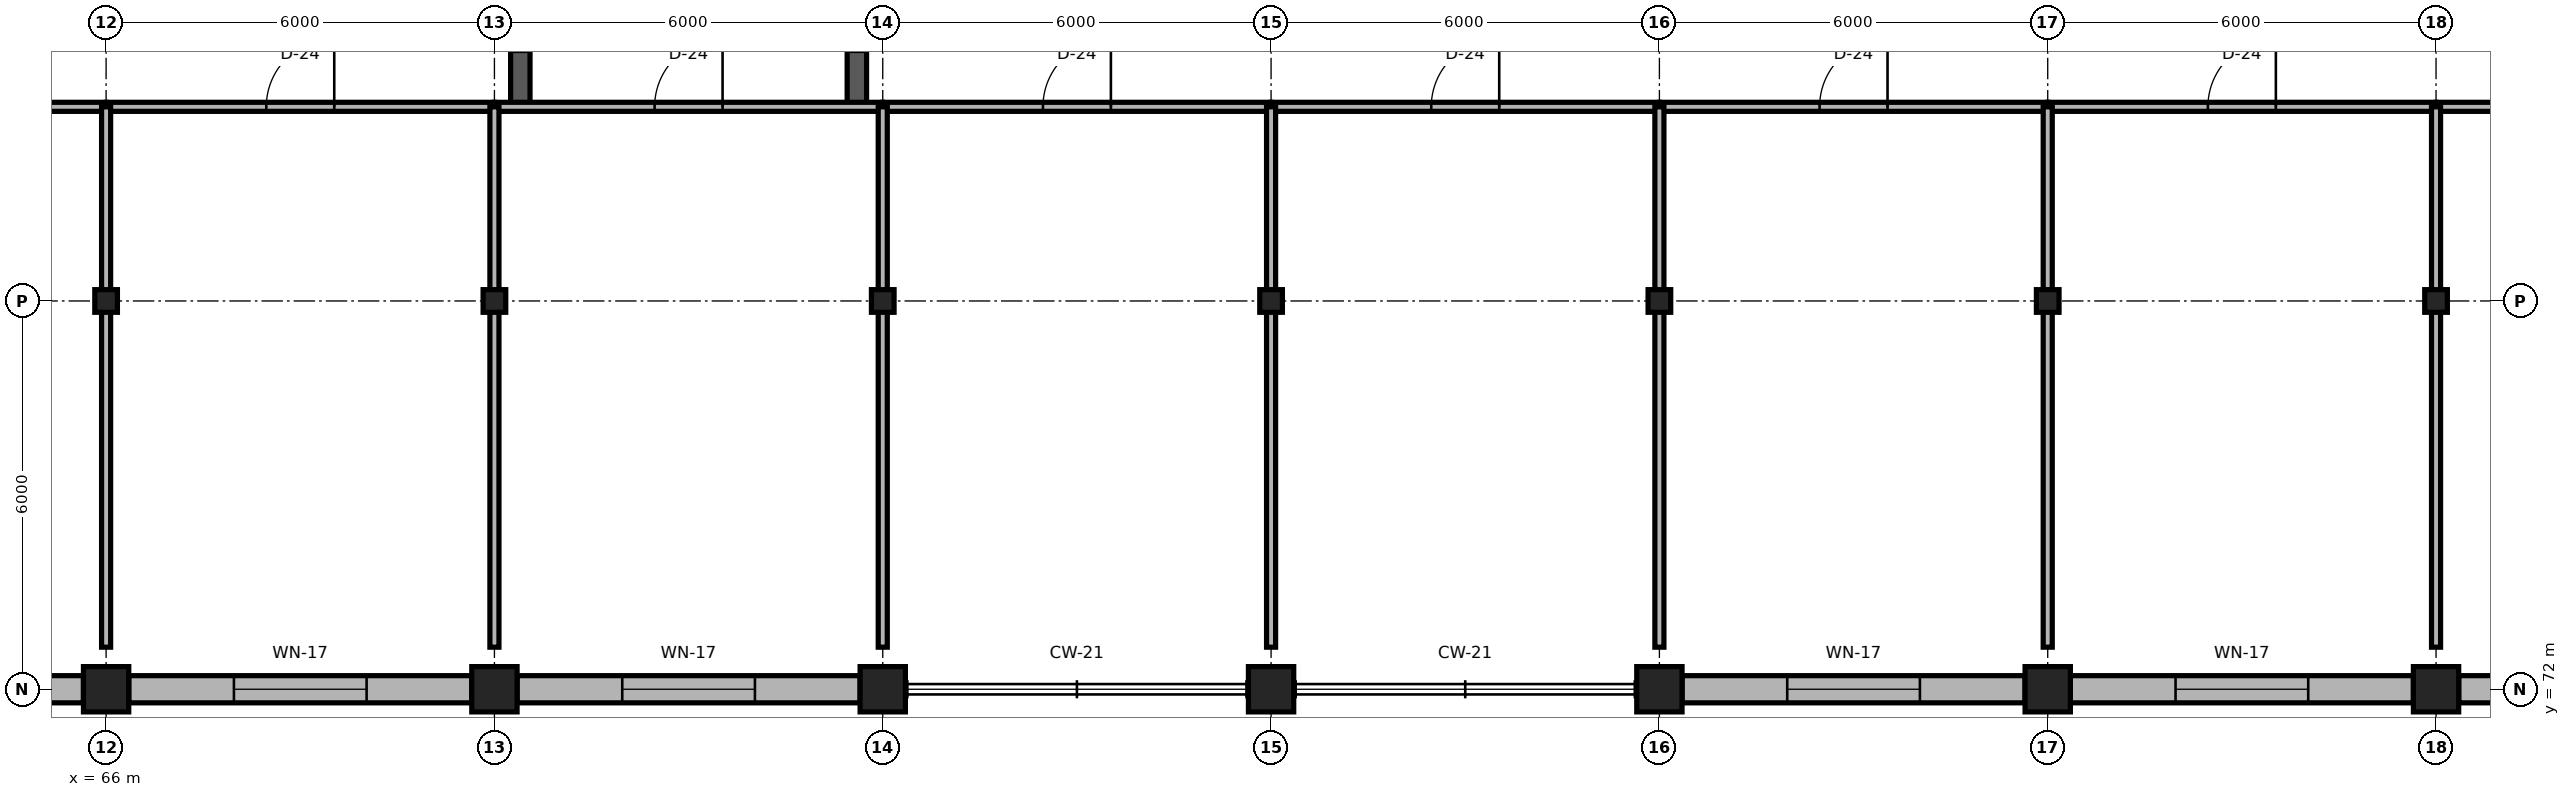
"""IFC4 building model, lengths in metres.
Left out: names, types, materials, properties, quantities, classifications, styles, units other than length and angle.
Written with IfcOpenShell. Run it as: python <this file> out.ifc"""

import sys

from ifc_helpers import new_model, si_unit, direction, frame, frame_2d, origin, origin_2d, place, context, subcontext, project, spatial, rectangle, i_section, extrude, element, fill, save


model = new_model("IFC4")
c1 = context("Model", 3, precision=1e-05, world=origin(), true_north=direction((0.0, 1.0)))
c2 = subcontext(c1, "Body", "Model", "MODEL_VIEW")
j1 = project(units=[si_unit("LENGTHUNIT", "METRE"), si_unit("PLANEANGLEUNIT", "RADIAN")], contexts=[c1])
p1 = place(None, origin())
s1 = spatial("IfcSite", under=j1, at=p1, CompositionType="ELEMENT")
p2 = place(p1, origin())
s2 = spatial("IfcBuilding", under=s1, at=p2, CompositionType="ELEMENT")
p3 = place(p2, frame((0.0, 0.0, 40.5)))
s3 = spatial("IfcBuildingStorey", under=s2, at=p3, CompositionType="ELEMENT", Elevation=40.5)
for number, where, z_axis, x_axis in (
    (1, (66.0, 72.0, 0.0), (0.0, 0.0, 1.0), (1.0, 0.0, 0.0)),
    (2, (72.0, 72.0, 0.0), (0.0, 0.0, 1.0), (1.0, 0.0, 0.0)),
    (3, (78.0, 72.0, 0.0), (0.0, 0.0, 1.0), (1.0, 0.0, 0.0)),
    (4, (84.0, 72.0, 0.0), (0.0, 0.0, 1.0), (1.0, 0.0, 0.0)),
    (5, (90.0, 72.0, 0.0), (0.0, 0.0, 1.0), (1.0, 0.0, 0.0)),
    (6, (96.0, 72.0, 0.0), (0.0, 0.0, 1.0), (1.0, 0.0, 0.0)),
    (7, (102.0, 72.0, 0.0), (0.0, 0.0, 1.0), (1.0, 0.0, 0.0)),
):
    element("IfcColumn", number, at=place(p3, frame(where, z_axis=z_axis, x_axis=x_axis)), inside=s3, PredefinedType="COLUMN", context=c2, shape_type="SweptSolid", body=[
        extrude(rectangle(XDim=0.7, YDim=0.7, at=origin_2d()), origin(), (0.0, 0.0, 1.0), 3.9),
    ])
for number, where, z_axis, x_axis in (
    (8, (66.0, 78.0, 0.0), (0.0, 0.0, 1.0), (1.0, 0.0, 0.0)),
    (9, (72.0, 78.0, 0.0), (0.0, 0.0, 1.0), (1.0, 0.0, 0.0)),
    (10, (78.0, 78.0, 0.0), (0.0, 0.0, 1.0), (1.0, 0.0, 0.0)),
    (11, (84.0, 78.0, 0.0), (0.0, 0.0, 1.0), (1.0, 0.0, 0.0)),
    (12, (90.0, 78.0, 0.0), (0.0, 0.0, 1.0), (1.0, 0.0, 0.0)),
    (13, (96.0, 78.0, 0.0), (0.0, 0.0, 1.0), (1.0, 0.0, 0.0)),
    (14, (102.0, 78.0, 0.0), (0.0, 0.0, 1.0), (1.0, 0.0, 0.0)),
):
    element("IfcColumn", number, at=place(p3, frame(where, z_axis=z_axis, x_axis=x_axis)), inside=s3, PredefinedType="COLUMN", context=c2, shape_type="SweptSolid", body=[
        extrude(i_section(OverallWidth=0.35, OverallDepth=0.35, WebThickness=0.012, FlangeThickness=0.019, FilletRadius=0.02, at=origin_2d()), origin(), (0.0, 0.0, 1.0), 3.9),
    ])
p4 = place(p3, frame((60.35, 72.0, 0.0), z_axis=(0.0, 0.0, 1.0), x_axis=(1.0, 0.0, 0.0)))
e15 = element("IfcWall", 15, at=p4, inside=s3, PredefinedType="SOLIDWALL", context=c2, shape_type="SweptSolid", body=[
    extrude(rectangle(XDim=5.3, YDim=0.42, at=frame_2d((2.65, 0.0))), origin(), (0.0, 0.0, 1.0), 3.32),
])
p5 = place(p4, frame((1.625, 0.0, 0.85)))
e16 = element("IfcOpeningElement", 16, at=p5, cuts=e15, PredefinedType="OPENING", context=c2, shape_type="SweptSolid", body=[
    extrude(rectangle(XDim=2.05, YDim=2.0, at=frame_2d((1.025, 1.0))), frame((0.0, 0.225, 0.0), z_axis=(0.0, -1.0, 0.0), x_axis=(1.0, 0.0, 0.0)), (0.0, 0.0, 1.0), 0.45),
])
p6 = place(p3, frame((66.35, 72.0, 0.0), z_axis=(0.0, 0.0, 1.0), x_axis=(1.0, 0.0, 0.0)))
e17 = element("IfcWall", 17, at=p6, inside=s3, PredefinedType="SOLIDWALL", context=c2, shape_type="SweptSolid", body=[
    extrude(rectangle(XDim=5.3, YDim=0.42, at=frame_2d((2.65, 0.0))), origin(), (0.0, 0.0, 1.0), 3.32),
])
p7 = place(p6, frame((1.625, 0.0, 0.85)))
e18 = element("IfcOpeningElement", 18, at=p7, cuts=e17, PredefinedType="OPENING", context=c2, shape_type="SweptSolid", body=[
    extrude(rectangle(XDim=2.05, YDim=2.0, at=frame_2d((1.025, 1.0))), frame((0.0, 0.225, 0.0), z_axis=(0.0, -1.0, 0.0), x_axis=(1.0, 0.0, 0.0)), (0.0, 0.0, 1.0), 0.45),
])
p8 = place(p3, frame((72.35, 72.0, 0.0), z_axis=(0.0, 0.0, 1.0), x_axis=(1.0, 0.0, 0.0)))
e19 = element("IfcWall", 19, at=p8, inside=s3, PredefinedType="SOLIDWALL", context=c2, shape_type="SweptSolid", body=[
    extrude(rectangle(XDim=5.3, YDim=0.42, at=frame_2d((2.65, 0.0))), origin(), (0.0, 0.0, 1.0), 3.32),
])
p9 = place(p8, frame((1.625, 0.0, 0.85)))
e20 = element("IfcOpeningElement", 20, at=p9, cuts=e19, PredefinedType="OPENING", context=c2, shape_type="SweptSolid", body=[
    extrude(rectangle(XDim=2.05, YDim=2.0, at=frame_2d((1.025, 1.0))), frame((0.0, 0.225, 0.0), z_axis=(0.0, -1.0, 0.0), x_axis=(1.0, 0.0, 0.0)), (0.0, 0.0, 1.0), 0.45),
])
p10 = place(p3, frame((90.35, 72.0, 0.0), z_axis=(0.0, 0.0, 1.0), x_axis=(1.0, 0.0, 0.0)))
e21 = element("IfcWall", 21, at=p10, inside=s3, PredefinedType="SOLIDWALL", context=c2, shape_type="SweptSolid", body=[
    extrude(rectangle(XDim=5.3, YDim=0.42, at=frame_2d((2.65, 0.0))), origin(), (0.0, 0.0, 1.0), 3.32),
])
p11 = place(p10, frame((1.625, 0.0, 0.85)))
e22 = element("IfcOpeningElement", 22, at=p11, cuts=e21, PredefinedType="OPENING", context=c2, shape_type="SweptSolid", body=[
    extrude(rectangle(XDim=2.05, YDim=2.0, at=frame_2d((1.025, 1.0))), frame((0.0, 0.225, 0.0), z_axis=(0.0, -1.0, 0.0), x_axis=(1.0, 0.0, 0.0)), (0.0, 0.0, 1.0), 0.45),
])
p12 = place(p3, frame((96.35, 72.0, 0.0), z_axis=(0.0, 0.0, 1.0), x_axis=(1.0, 0.0, 0.0)))
e23 = element("IfcWall", 23, at=p12, inside=s3, PredefinedType="SOLIDWALL", context=c2, shape_type="SweptSolid", body=[
    extrude(rectangle(XDim=5.3, YDim=0.42, at=frame_2d((2.65, 0.0))), origin(), (0.0, 0.0, 1.0), 3.32),
])
p13 = place(p12, frame((1.625, 0.0, 0.85)))
e24 = element("IfcOpeningElement", 24, at=p13, cuts=e23, PredefinedType="OPENING", context=c2, shape_type="SweptSolid", body=[
    extrude(rectangle(XDim=2.05, YDim=2.0, at=frame_2d((1.025, 1.0))), frame((0.0, 0.225, 0.0), z_axis=(0.0, -1.0, 0.0), x_axis=(1.0, 0.0, 0.0)), (0.0, 0.0, 1.0), 0.45),
])
p14 = place(p3, frame((102.35, 72.0, 0.0), z_axis=(0.0, 0.0, 1.0), x_axis=(1.0, 0.0, 0.0)))
e25 = element("IfcWall", 25, at=p14, inside=s3, PredefinedType="SOLIDWALL", context=c2, shape_type="SweptSolid", body=[
    extrude(rectangle(XDim=5.3, YDim=0.42, at=frame_2d((2.65, 0.0))), origin(), (0.0, 0.0, 1.0), 3.32),
])
p15 = place(p14, frame((1.625, 0.0, 0.85)))
e26 = element("IfcOpeningElement", 26, at=p15, cuts=e25, PredefinedType="OPENING", context=c2, shape_type="SweptSolid", body=[
    extrude(rectangle(XDim=2.05, YDim=2.0, at=frame_2d((1.025, 1.0))), frame((0.0, 0.225, 0.0), z_axis=(0.0, -1.0, 0.0), x_axis=(1.0, 0.0, 0.0)), (0.0, 0.0, 1.0), 0.45),
])
p16 = place(p3, frame((72.4, 81.0, 0.0), z_axis=(0.0, 0.0, 1.0), x_axis=(0.0, 1.0, 0.0)))
e27 = element("IfcWall", 27, at=p16, inside=s3, PredefinedType="SHEAR", context=c2, shape_type="SweptSolid", body=[
    extrude(rectangle(XDim=3.0, YDim=0.3, at=frame_2d((1.5, 0.0))), origin(), (0.0, 0.0, 1.0), 3.74),
])
p17 = place(p16, frame((0.85, 0.0, 0.0)))
e28 = element("IfcOpeningElement", 28, at=p17, cuts=e27, PredefinedType="OPENING", context=c2, shape_type="SweptSolid", body=[
    extrude(rectangle(XDim=1.3, YDim=2.2, at=frame_2d((0.65, 1.1))), frame((0.0, 0.165, 0.0), z_axis=(0.0, -1.0, 0.0), x_axis=(1.0, 0.0, 0.0)), (0.0, 0.0, 1.0), 0.33),
])
p18 = place(p3, frame((77.6, 81.0, 0.0), z_axis=(0.0, 0.0, 1.0), x_axis=(0.0, 1.0, 0.0)))
e29 = element("IfcWall", 29, at=p18, inside=s3, PredefinedType="SHEAR", context=c2, shape_type="SweptSolid", body=[
    extrude(rectangle(XDim=3.0, YDim=0.3, at=frame_2d((1.5, 0.0))), origin(), (0.0, 0.0, 1.0), 3.74),
])
p19 = place(p18, frame((0.85, 0.0, 0.0)))
e30 = element("IfcOpeningElement", 30, at=p19, cuts=e29, PredefinedType="OPENING", context=c2, shape_type="SweptSolid", body=[
    extrude(rectangle(XDim=1.3, YDim=2.2, at=frame_2d((0.65, 1.1))), frame((0.0, 0.165, 0.0), z_axis=(0.0, -1.0, 0.0), x_axis=(1.0, 0.0, 0.0)), (0.0, 0.0, 1.0), 0.33),
])
p20 = place(p3, frame((61.7, 81.0, 0.0), z_axis=(0.0, 0.0, 1.0), x_axis=(1.0, 0.0, 0.0)))
e31 = element("IfcWall", 31, at=p20, inside=s3, PredefinedType="PARTITIONING", context=c2, shape_type="SweptSolid", body=[
    extrude(rectangle(XDim=4.3, YDim=0.14, at=frame_2d((2.15, 0.0))), origin(), (0.0, 0.0, 1.0), 3.74),
])
p21 = place(p20, frame((1.625, 0.0, 0.0)))
e32 = element("IfcOpeningElement", 32, at=p21, cuts=e31, PredefinedType="OPENING", context=c2, shape_type="SweptSolid", body=[
    extrude(rectangle(XDim=1.05, YDim=2.25, at=frame_2d((0.525, 1.125))), frame((0.0, 0.085, 0.0), z_axis=(0.0, -1.0, 0.0), x_axis=(1.0, 0.0, 0.0)), (0.0, 0.0, 1.0), 0.17),
])
p22 = place(p3, frame((66.0, 81.0, 0.0), z_axis=(0.0, 0.0, 1.0), x_axis=(1.0, 0.0, 0.0)))
e33 = element("IfcWall", 33, at=p22, inside=s3, PredefinedType="PARTITIONING", context=c2, shape_type="SweptSolid", body=[
    extrude(rectangle(XDim=6.0, YDim=0.14, at=frame_2d((3.0, 0.0))), origin(), (0.0, 0.0, 1.0), 3.74),
])
p23 = place(p22, frame((2.475, 0.0, 0.0)))
e34 = element("IfcOpeningElement", 34, at=p23, cuts=e33, PredefinedType="OPENING", context=c2, shape_type="SweptSolid", body=[
    extrude(rectangle(XDim=1.05, YDim=2.25, at=frame_2d((0.525, 1.125))), frame((0.0, 0.085, 0.0), z_axis=(0.0, -1.0, 0.0), x_axis=(1.0, 0.0, 0.0)), (0.0, 0.0, 1.0), 0.17),
])
p24 = place(p3, frame((72.0, 81.0, 0.0), z_axis=(0.0, 0.0, 1.0), x_axis=(1.0, 0.0, 0.0)))
e35 = element("IfcWall", 35, at=p24, inside=s3, PredefinedType="PARTITIONING", context=c2, shape_type="SweptSolid", body=[
    extrude(rectangle(XDim=6.0, YDim=0.14, at=frame_2d((3.0, 0.0))), origin(), (0.0, 0.0, 1.0), 3.74),
])
p25 = place(p24, frame((2.475, 0.0, 0.0)))
e36 = element("IfcOpeningElement", 36, at=p25, cuts=e35, PredefinedType="OPENING", context=c2, shape_type="SweptSolid", body=[
    extrude(rectangle(XDim=1.05, YDim=2.25, at=frame_2d((0.525, 1.125))), frame((0.0, 0.085, 0.0), z_axis=(0.0, -1.0, 0.0), x_axis=(1.0, 0.0, 0.0)), (0.0, 0.0, 1.0), 0.17),
])
p26 = place(p3, frame((78.0, 81.0, 0.0), z_axis=(0.0, 0.0, 1.0), x_axis=(1.0, 0.0, 0.0)))
e37 = element("IfcWall", 37, at=p26, inside=s3, PredefinedType="PARTITIONING", context=c2, shape_type="SweptSolid", body=[
    extrude(rectangle(XDim=6.0, YDim=0.14, at=frame_2d((3.0, 0.0))), origin(), (0.0, 0.0, 1.0), 3.74),
])
p27 = place(p26, frame((2.475, 0.0, 0.0)))
e38 = element("IfcOpeningElement", 38, at=p27, cuts=e37, PredefinedType="OPENING", context=c2, shape_type="SweptSolid", body=[
    extrude(rectangle(XDim=1.05, YDim=2.25, at=frame_2d((0.525, 1.125))), frame((0.0, 0.085, 0.0), z_axis=(0.0, -1.0, 0.0), x_axis=(1.0, 0.0, 0.0)), (0.0, 0.0, 1.0), 0.17),
])
p28 = place(p3, frame((84.0, 81.0, 0.0), z_axis=(0.0, 0.0, 1.0), x_axis=(1.0, 0.0, 0.0)))
e39 = element("IfcWall", 39, at=p28, inside=s3, PredefinedType="PARTITIONING", context=c2, shape_type="SweptSolid", body=[
    extrude(rectangle(XDim=6.0, YDim=0.14, at=frame_2d((3.0, 0.0))), origin(), (0.0, 0.0, 1.0), 3.74),
])
p29 = place(p28, frame((2.475, 0.0, 0.0)))
e40 = element("IfcOpeningElement", 40, at=p29, cuts=e39, PredefinedType="OPENING", context=c2, shape_type="SweptSolid", body=[
    extrude(rectangle(XDim=1.05, YDim=2.25, at=frame_2d((0.525, 1.125))), frame((0.0, 0.085, 0.0), z_axis=(0.0, -1.0, 0.0), x_axis=(1.0, 0.0, 0.0)), (0.0, 0.0, 1.0), 0.17),
])
p30 = place(p3, frame((90.0, 81.0, 0.0), z_axis=(0.0, 0.0, 1.0), x_axis=(1.0, 0.0, 0.0)))
e41 = element("IfcWall", 41, at=p30, inside=s3, PredefinedType="PARTITIONING", context=c2, shape_type="SweptSolid", body=[
    extrude(rectangle(XDim=6.0, YDim=0.14, at=frame_2d((3.0, 0.0))), origin(), (0.0, 0.0, 1.0), 3.74),
])
p31 = place(p30, frame((2.475, 0.0, 0.0)))
e42 = element("IfcOpeningElement", 42, at=p31, cuts=e41, PredefinedType="OPENING", context=c2, shape_type="SweptSolid", body=[
    extrude(rectangle(XDim=1.05, YDim=2.25, at=frame_2d((0.525, 1.125))), frame((0.0, 0.085, 0.0), z_axis=(0.0, -1.0, 0.0), x_axis=(1.0, 0.0, 0.0)), (0.0, 0.0, 1.0), 0.17),
])
p32 = place(p3, frame((96.0, 81.0, 0.0), z_axis=(0.0, 0.0, 1.0), x_axis=(1.0, 0.0, 0.0)))
e43 = element("IfcWall", 43, at=p32, inside=s3, PredefinedType="PARTITIONING", context=c2, shape_type="SweptSolid", body=[
    extrude(rectangle(XDim=6.0, YDim=0.14, at=frame_2d((3.0, 0.0))), origin(), (0.0, 0.0, 1.0), 3.74),
])
p33 = place(p32, frame((2.475, 0.0, 0.0)))
e44 = element("IfcOpeningElement", 44, at=p33, cuts=e43, PredefinedType="OPENING", context=c2, shape_type="SweptSolid", body=[
    extrude(rectangle(XDim=1.05, YDim=2.25, at=frame_2d((0.525, 1.125))), frame((0.0, 0.085, 0.0), z_axis=(0.0, -1.0, 0.0), x_axis=(1.0, 0.0, 0.0)), (0.0, 0.0, 1.0), 0.17),
])
p34 = place(p3, frame((102.0, 81.0, 0.0), z_axis=(0.0, 0.0, 1.0), x_axis=(1.0, 0.0, 0.0)))
e45 = element("IfcWall", 45, at=p34, inside=s3, PredefinedType="PARTITIONING", context=c2, shape_type="SweptSolid", body=[
    extrude(rectangle(XDim=4.3, YDim=0.14, at=frame_2d((2.15, 0.0))), origin(), (0.0, 0.0, 1.0), 3.74),
])
p35 = place(p34, frame((1.625, 0.0, 0.0)))
e46 = element("IfcOpeningElement", 46, at=p35, cuts=e45, PredefinedType="OPENING", context=c2, shape_type="SweptSolid", body=[
    extrude(rectangle(XDim=1.05, YDim=2.25, at=frame_2d((0.525, 1.125))), frame((0.0, 0.085, 0.0), z_axis=(0.0, -1.0, 0.0), x_axis=(1.0, 0.0, 0.0)), (0.0, 0.0, 1.0), 0.17),
])
for number, where, z_axis, x_axis in (
    (47, (66.0, 72.65, 0.0), (0.0, 0.0, 1.0), (0.0, 1.0, 0.0)),
    (48, (72.0, 72.65, 0.0), (0.0, 0.0, 1.0), (0.0, 1.0, 0.0)),
    (49, (78.0, 72.65, 0.0), (0.0, 0.0, 1.0), (0.0, 1.0, 0.0)),
    (50, (84.0, 72.65, 0.0), (0.0, 0.0, 1.0), (0.0, 1.0, 0.0)),
    (51, (90.0, 72.65, 0.0), (0.0, 0.0, 1.0), (0.0, 1.0, 0.0)),
    (52, (96.0, 72.65, 0.0), (0.0, 0.0, 1.0), (0.0, 1.0, 0.0)),
    (53, (102.0, 72.65, 0.0), (0.0, 0.0, 1.0), (0.0, 1.0, 0.0)),
):
    element("IfcWall", number, at=place(p3, frame(where, z_axis=z_axis, x_axis=x_axis)), inside=s3, PredefinedType="PARTITIONING", context=c2, shape_type="SweptSolid", body=[
        extrude(rectangle(XDim=8.35, YDim=0.14, at=frame_2d((4.175, 0.0))), origin(), (0.0, 0.0, 1.0), 3.348),
    ])
p36 = place(p7, origin())
e54 = element("IfcWindow", 54, at=p36, inside=s3, PartitioningType="SINGLE_PANEL", PredefinedType="WINDOW", context=c2, shape_type="SweptSolid", body=[
    extrude(rectangle(XDim=2.05, YDim=2.0, at=frame_2d((1.025, 1.0))), frame((0.0, 0.03, 0.0), z_axis=(0.0, -1.0, 0.0), x_axis=(1.0, 0.0, 0.0)), (0.0, 0.0, 1.0), 0.06),
])
fill(e18, e54)
p37 = place(p9, origin())
e55 = element("IfcWindow", 55, at=p37, inside=s3, PartitioningType="SINGLE_PANEL", PredefinedType="WINDOW", context=c2, shape_type="SweptSolid", body=[
    extrude(rectangle(XDim=2.05, YDim=2.0, at=frame_2d((1.025, 1.0))), frame((0.0, 0.03, 0.0), z_axis=(0.0, -1.0, 0.0), x_axis=(1.0, 0.0, 0.0)), (0.0, 0.0, 1.0), 0.06),
])
fill(e20, e55)
p38 = place(p11, origin())
e56 = element("IfcWindow", 56, at=p38, inside=s3, PartitioningType="SINGLE_PANEL", PredefinedType="WINDOW", context=c2, shape_type="SweptSolid", body=[
    extrude(rectangle(XDim=2.05, YDim=2.0, at=frame_2d((1.025, 1.0))), frame((0.0, 0.03, 0.0), z_axis=(0.0, -1.0, 0.0), x_axis=(1.0, 0.0, 0.0)), (0.0, 0.0, 1.0), 0.06),
])
fill(e22, e56)
p39 = place(p13, origin())
e57 = element("IfcWindow", 57, at=p39, inside=s3, PartitioningType="SINGLE_PANEL", PredefinedType="WINDOW", context=c2, shape_type="SweptSolid", body=[
    extrude(rectangle(XDim=2.05, YDim=2.0, at=frame_2d((1.025, 1.0))), frame((0.0, 0.03, 0.0), z_axis=(0.0, -1.0, 0.0), x_axis=(1.0, 0.0, 0.0)), (0.0, 0.0, 1.0), 0.06),
])
fill(e24, e57)
p40 = place(p23, origin())
e58 = element("IfcDoor", 58, at=p40, inside=s3, OperationType="SINGLE_SWING_RIGHT", PredefinedType="DOOR", context=c2, shape_type="SweptSolid", body=[
    extrude(rectangle(XDim=1.05, YDim=2.25, at=frame_2d((0.525, 1.125))), frame((0.0, 0.025, 0.0), z_axis=(0.0, -1.0, 0.0), x_axis=(1.0, 0.0, 0.0)), (0.0, 0.0, 1.0), 0.05),
])
fill(e34, e58)
p41 = place(p25, origin())
e59 = element("IfcDoor", 59, at=p41, inside=s3, OperationType="SINGLE_SWING_RIGHT", PredefinedType="DOOR", context=c2, shape_type="SweptSolid", body=[
    extrude(rectangle(XDim=1.05, YDim=2.25, at=frame_2d((0.525, 1.125))), frame((0.0, 0.025, 0.0), z_axis=(0.0, -1.0, 0.0), x_axis=(1.0, 0.0, 0.0)), (0.0, 0.0, 1.0), 0.05),
])
fill(e36, e59)
p42 = place(p27, origin())
e60 = element("IfcDoor", 60, at=p42, inside=s3, OperationType="SINGLE_SWING_RIGHT", PredefinedType="DOOR", context=c2, shape_type="SweptSolid", body=[
    extrude(rectangle(XDim=1.05, YDim=2.25, at=frame_2d((0.525, 1.125))), frame((0.0, 0.025, 0.0), z_axis=(0.0, -1.0, 0.0), x_axis=(1.0, 0.0, 0.0)), (0.0, 0.0, 1.0), 0.05),
])
fill(e38, e60)
p43 = place(p29, origin())
e61 = element("IfcDoor", 61, at=p43, inside=s3, OperationType="SINGLE_SWING_RIGHT", PredefinedType="DOOR", context=c2, shape_type="SweptSolid", body=[
    extrude(rectangle(XDim=1.05, YDim=2.25, at=frame_2d((0.525, 1.125))), frame((0.0, 0.025, 0.0), z_axis=(0.0, -1.0, 0.0), x_axis=(1.0, 0.0, 0.0)), (0.0, 0.0, 1.0), 0.05),
])
fill(e40, e61)
p44 = place(p31, origin())
e62 = element("IfcDoor", 62, at=p44, inside=s3, OperationType="SINGLE_SWING_RIGHT", PredefinedType="DOOR", context=c2, shape_type="SweptSolid", body=[
    extrude(rectangle(XDim=1.05, YDim=2.25, at=frame_2d((0.525, 1.125))), frame((0.0, 0.025, 0.0), z_axis=(0.0, -1.0, 0.0), x_axis=(1.0, 0.0, 0.0)), (0.0, 0.0, 1.0), 0.05),
])
fill(e42, e62)
p45 = place(p33, origin())
e63 = element("IfcDoor", 63, at=p45, inside=s3, OperationType="SINGLE_SWING_RIGHT", PredefinedType="DOOR", context=c2, shape_type="SweptSolid", body=[
    extrude(rectangle(XDim=1.05, YDim=2.25, at=frame_2d((0.525, 1.125))), frame((0.0, 0.025, 0.0), z_axis=(0.0, -1.0, 0.0), x_axis=(1.0, 0.0, 0.0)), (0.0, 0.0, 1.0), 0.05),
])
fill(e44, e63)
save(model, sys.argv[1])
